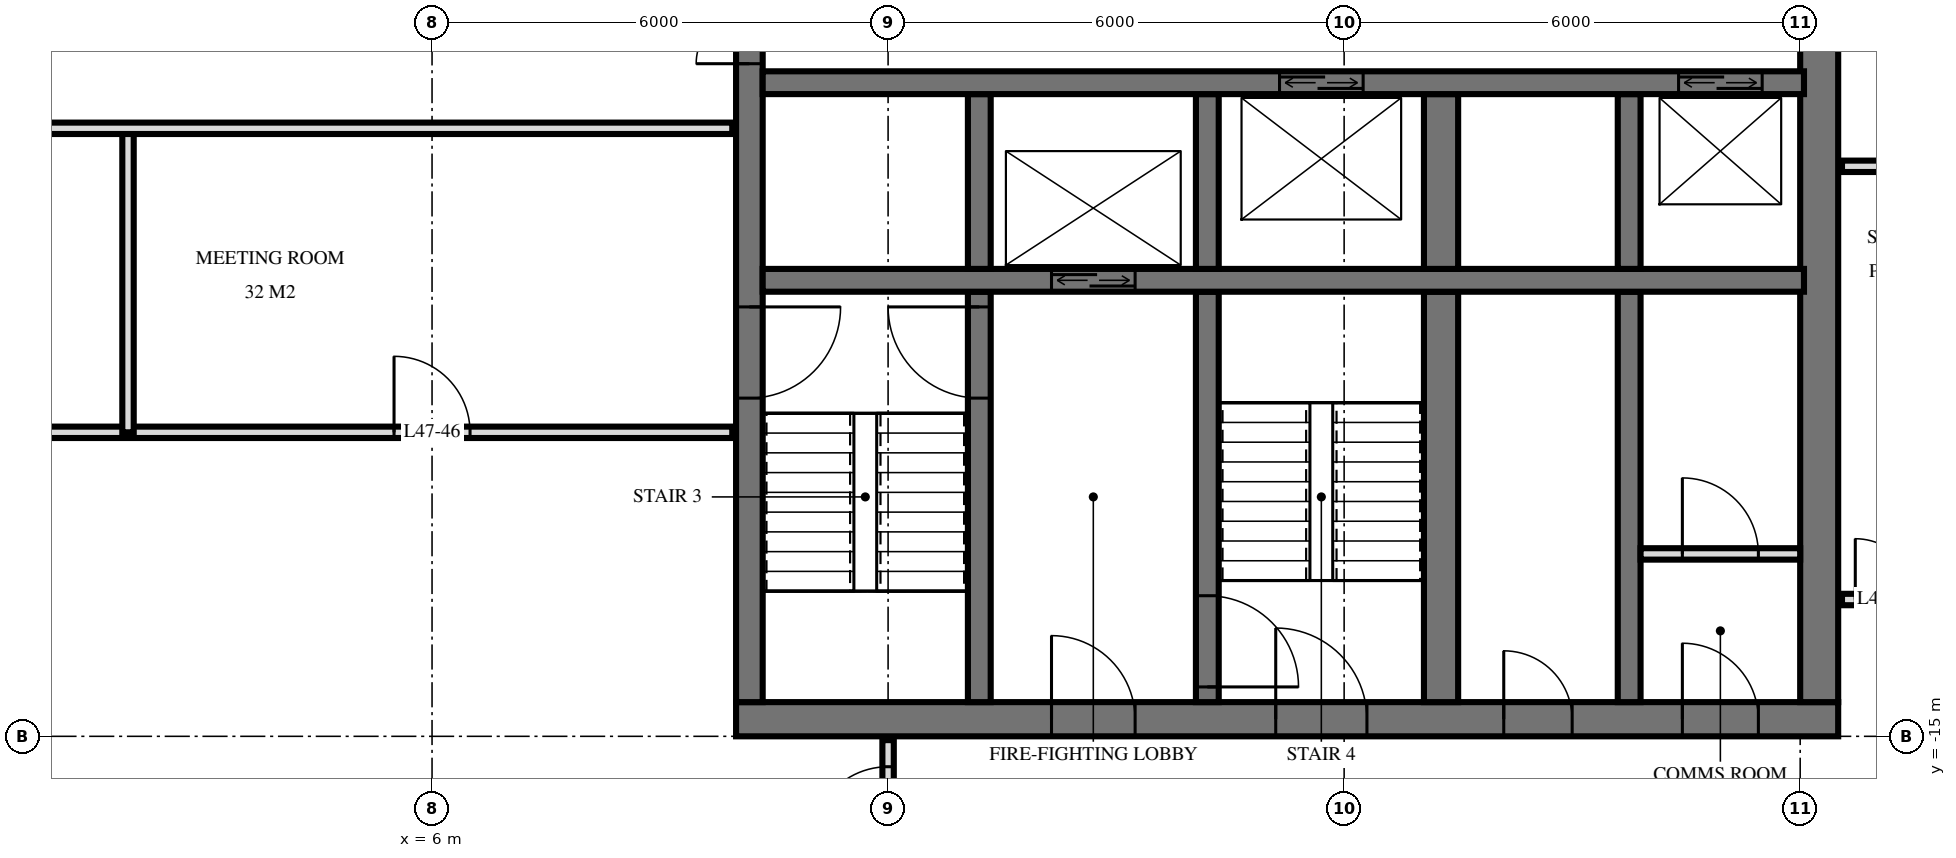
"""IFC4 building model, lengths in metres.
Left out: names, types, materials, properties, quantities, classifications, styles, units other than length and angle.
Written with IfcOpenShell. Run it as: python <this file> out.ifc"""

import sys

from ifc_helpers import new_model, si_unit, direction, frame, frame_2d, origin, place, context, subcontext, project, spatial, rectangle, extrude, element, fill, save


model = new_model("IFC4")
c1 = context("Model", 3, precision=1e-05, world=origin(), true_north=direction((0.0, 1.0)))
c2 = subcontext(c1, "Body", "Model", "MODEL_VIEW")
j1 = project(units=[si_unit("LENGTHUNIT", "METRE"), si_unit("PLANEANGLEUNIT", "RADIAN")], contexts=[c1])
p1 = place(None, origin())
s1 = spatial("IfcSite", under=j1, at=p1, CompositionType="ELEMENT")
p2 = place(p1, origin())
s2 = spatial("IfcBuilding", under=s1, at=p2, CompositionType="ELEMENT")
p3 = place(p2, frame((0.0, 0.0, 183.6)))
s3 = spatial("IfcBuildingStorey", under=s2, at=p3, CompositionType="ELEMENT", Elevation=183.6)
p4 = place(p3, frame((10.0, -14.775, 0.0), z_axis=(0.0, 0.0, 1.0), x_axis=(1.0, 0.0, 0.0)))
e1 = element("IfcWall", 1, at=p4, inside=s3, PredefinedType="SHEAR", context=c2, shape_type="SweptSolid", body=[
    extrude(rectangle(XDim=14.5, YDim=0.45, at=frame_2d((7.25, 0.0))), origin(), (0.0, 0.0, 1.0), 3.5),
])
p5 = place(p4, frame((7.1, 0.0, 0.0)))
e2 = element("IfcOpeningElement", 2, at=p5, cuts=e1, PredefinedType="OPENING", context=c2, shape_type="SweptSolid", body=[
    extrude(rectangle(XDim=1.2, YDim=2.1, at=frame_2d((0.6, 1.05))), frame((0.0, 0.235, 0.0), z_axis=(0.0, -1.0, 0.0), x_axis=(1.0, 0.0, 0.0)), (0.0, 0.0, 1.0), 0.47),
])
p6 = place(p4, frame((4.15, 0.0, 0.0)))
e3 = element("IfcOpeningElement", 3, at=p6, cuts=e1, PredefinedType="OPENING", context=c2, shape_type="SweptSolid", body=[
    extrude(rectangle(XDim=1.1, YDim=2.1, at=frame_2d((0.55, 1.05))), frame((0.0, 0.235, 0.0), z_axis=(0.0, -1.0, 0.0), x_axis=(1.0, 0.0, 0.0)), (0.0, 0.0, 1.0), 0.47),
])
p7 = place(p4, frame((10.1, 0.0, 0.0)))
e4 = element("IfcOpeningElement", 4, at=p7, cuts=e1, PredefinedType="OPENING", context=c2, shape_type="SweptSolid", body=[
    extrude(rectangle(XDim=0.9, YDim=2.1, at=frame_2d((0.45, 1.05))), frame((0.0, 0.235, 0.0), z_axis=(0.0, -1.0, 0.0), x_axis=(1.0, 0.0, 0.0)), (0.0, 0.0, 1.0), 0.47),
])
p8 = place(p4, frame((12.45, 0.0, 0.0)))
e5 = element("IfcOpeningElement", 5, at=p8, cuts=e1, PredefinedType="OPENING", context=c2, shape_type="SweptSolid", body=[
    extrude(rectangle(XDim=1.0, YDim=2.1, at=frame_2d((0.5, 1.05))), frame((0.0, 0.235, 0.0), z_axis=(0.0, -1.0, 0.0), x_axis=(1.0, 0.0, 0.0)), (0.0, 0.0, 1.0), 0.47),
])
p9 = place(p3, frame((10.175, -14.55, 0.0), z_axis=(0.0, 0.0, 1.0), x_axis=(0.0, 1.0, 0.0)))
e6 = element("IfcWall", 6, at=p9, inside=s3, PredefinedType="SHEAR", context=c2, shape_type="SweptSolid", body=[
    extrude(rectangle(XDim=14.1, YDim=0.35, at=frame_2d((7.05, 0.0))), origin(), (0.0, 0.0, 1.0), 3.5),
])
p10 = place(p9, frame((8.4, 0.0, 0.0)))
e7 = element("IfcOpeningElement", 7, at=p10, cuts=e6, PredefinedType="OPENING", context=c2, shape_type="SweptSolid", body=[
    extrude(rectangle(XDim=1.4, YDim=2.4, at=frame_2d((0.7, 1.2))), frame((0.0, 0.185, 0.0), z_axis=(0.0, -1.0, 0.0), x_axis=(1.0, 0.0, 0.0)), (0.0, 0.0, 1.0), 0.37),
])
p11 = place(p9, frame((10.0, 0.0, 0.0)))
e8 = element("IfcOpeningElement", 8, at=p11, cuts=e6, PredefinedType="OPENING", context=c2, shape_type="SweptSolid", body=[
    extrude(rectangle(XDim=1.4, YDim=2.4, at=frame_2d((0.7, 1.2))), frame((0.0, 0.185, 0.0), z_axis=(0.0, -1.0, 0.0), x_axis=(1.0, 0.0, 0.0)), (0.0, 0.0, 1.0), 0.37),
])
p12 = place(p9, frame((4.0, 0.0, 0.0)))
e9 = element("IfcOpeningElement", 9, at=p12, cuts=e6, PredefinedType="OPENING", context=c2, shape_type="SweptSolid", body=[
    extrude(rectangle(XDim=1.2, YDim=2.1, at=frame_2d((0.6, 1.05))), frame((0.0, 0.185, 0.0), z_axis=(0.0, -1.0, 0.0), x_axis=(1.0, 0.0, 0.0)), (0.0, 0.0, 1.0), 0.37),
])
p13 = place(p3, frame((24.25, -14.55, 0.0), z_axis=(0.0, 0.0, 1.0), x_axis=(0.0, 1.0, 0.0)))
e10 = element("IfcWall", 10, at=p13, inside=s3, PredefinedType="SHEAR", context=c2, shape_type="SweptSolid", body=[
    extrude(rectangle(XDim=14.1, YDim=0.5, at=frame_2d((7.05, 0.0))), origin(), (0.0, 0.0, 1.0), 3.5),
])
p14 = place(p3, frame((10.35, -6.4, 0.0), z_axis=(0.0, 0.0, 1.0), x_axis=(1.0, 0.0, 0.0)))
e11 = element("IfcWall", 11, at=p14, inside=s3, PredefinedType="SHEAR", context=c2, shape_type="SweptSolid", body=[
    extrude(rectangle(XDim=13.7, YDim=0.3, at=frame_2d((6.85, 0.0))), origin(), (0.0, 0.0, 1.0), 3.5),
])
p15 = place(p14, frame((12.05, 0.0, 0.0)))
e12 = element("IfcOpeningElement", 12, at=p15, cuts=e11, PredefinedType="OPENING", context=c2, shape_type="SweptSolid", body=[
    extrude(rectangle(XDim=1.1, YDim=2.1, at=frame_2d((0.55, 1.05))), frame((0.0, 0.16, 0.0), z_axis=(0.0, -1.0, 0.0), x_axis=(1.0, 0.0, 0.0)), (0.0, 0.0, 1.0), 0.32),
])
p16 = place(p14, frame((6.8, 0.0, 0.0)))
e13 = element("IfcOpeningElement", 13, at=p16, cuts=e11, PredefinedType="OPENING", context=c2, shape_type="SweptSolid", body=[
    extrude(rectangle(XDim=1.1, YDim=2.1, at=frame_2d((0.55, 1.05))), frame((0.0, 0.16, 0.0), z_axis=(0.0, -1.0, 0.0), x_axis=(1.0, 0.0, 0.0)), (0.0, 0.0, 1.0), 0.32),
])
p17 = place(p3, frame((10.35, -9.0, 0.0), z_axis=(0.0, 0.0, 1.0), x_axis=(1.0, 0.0, 0.0)))
e14 = element("IfcWall", 14, at=p17, inside=s3, PredefinedType="SHEAR", context=c2, shape_type="SweptSolid", body=[
    extrude(rectangle(XDim=13.7, YDim=0.3, at=frame_2d((6.85, 0.0))), origin(), (0.0, 0.0, 1.0), 3.5),
])
p18 = place(p17, frame((3.8, 0.0, 0.0)))
e15 = element("IfcOpeningElement", 15, at=p18, cuts=e14, PredefinedType="OPENING", context=c2, shape_type="SweptSolid", body=[
    extrude(rectangle(XDim=1.1, YDim=2.1, at=frame_2d((0.55, 1.05))), frame((0.0, 0.16, 0.0), z_axis=(0.0, -1.0, 0.0), x_axis=(1.0, 0.0, 0.0)), (0.0, 0.0, 1.0), 0.32),
])
p19 = place(p3, frame((13.2, -8.85, 0.0), z_axis=(0.0, 0.0, 1.0), x_axis=(0.0, 1.0, 0.0)))
e16 = element("IfcWall", 16, at=p19, inside=s3, PredefinedType="SHEAR", context=c2, shape_type="SweptSolid", body=[
    extrude(rectangle(XDim=2.3, YDim=0.3, at=frame_2d((1.15, 0.0))), origin(), (0.0, 0.0, 1.0), 3.5),
])
p20 = place(p3, frame((13.2, -14.55, 0.0), z_axis=(0.0, 0.0, 1.0), x_axis=(0.0, 1.0, 0.0)))
e17 = element("IfcWall", 17, at=p20, inside=s3, PredefinedType="SHEAR", context=c2, shape_type="SweptSolid", body=[
    extrude(rectangle(XDim=5.4, YDim=0.3, at=frame_2d((2.7, 0.0))), origin(), (0.0, 0.0, 1.0), 3.5),
])
p21 = place(p20, frame((4.0, 0.0, 0.0)))
e18 = element("IfcOpeningElement", 18, at=p21, cuts=e17, PredefinedType="OPENING", context=c2, shape_type="SweptSolid", body=[
    extrude(rectangle(XDim=1.2, YDim=2.1, at=frame_2d((0.6, 1.05))), frame((0.0, 0.16, 0.0), z_axis=(0.0, -1.0, 0.0), x_axis=(1.0, 0.0, 0.0)), (0.0, 0.0, 1.0), 0.32),
])
p22 = place(p3, frame((16.2, -8.85, 0.0), z_axis=(0.0, 0.0, 1.0), x_axis=(0.0, 1.0, 0.0)))
e19 = element("IfcWall", 19, at=p22, inside=s3, PredefinedType="SHEAR", context=c2, shape_type="SweptSolid", body=[
    extrude(rectangle(XDim=2.3, YDim=0.3, at=frame_2d((1.15, 0.0))), origin(), (0.0, 0.0, 1.0), 3.5),
])
p23 = place(p3, frame((16.2, -14.55, 0.0), z_axis=(0.0, 0.0, 1.0), x_axis=(0.0, 1.0, 0.0)))
e20 = element("IfcWall", 20, at=p23, inside=s3, PredefinedType="SHEAR", context=c2, shape_type="SweptSolid", body=[
    extrude(rectangle(XDim=5.4, YDim=0.3, at=frame_2d((2.7, 0.0))), origin(), (0.0, 0.0, 1.0), 3.5),
])
p24 = place(p23, frame((0.2, 0.0, 0.0)))
e21 = element("IfcOpeningElement", 21, at=p24, cuts=e20, PredefinedType="OPENING", context=c2, shape_type="SweptSolid", body=[
    extrude(rectangle(XDim=1.2, YDim=2.1, at=frame_2d((0.6, 1.05))), frame((0.0, 0.16, 0.0), z_axis=(0.0, -1.0, 0.0), x_axis=(1.0, 0.0, 0.0)), (0.0, 0.0, 1.0), 0.32),
])
p25 = place(p3, frame((19.275, -8.85, 0.0), z_axis=(0.0, 0.0, 1.0), x_axis=(0.0, 1.0, 0.0)))
e22 = element("IfcWall", 22, at=p25, inside=s3, PredefinedType="SHEAR", context=c2, shape_type="SweptSolid", body=[
    extrude(rectangle(XDim=2.3, YDim=0.45, at=frame_2d((1.15, 0.0))), origin(), (0.0, 0.0, 1.0), 3.5),
])
p26 = place(p3, frame((19.275, -14.55, 0.0), z_axis=(0.0, 0.0, 1.0), x_axis=(0.0, 1.0, 0.0)))
e23 = element("IfcWall", 23, at=p26, inside=s3, PredefinedType="SHEAR", context=c2, shape_type="SweptSolid", body=[
    extrude(rectangle(XDim=5.4, YDim=0.45, at=frame_2d((2.7, 0.0))), origin(), (0.0, 0.0, 1.0), 3.5),
])
p27 = place(p3, frame((21.75, -8.85, 0.0), z_axis=(0.0, 0.0, 1.0), x_axis=(0.0, 1.0, 0.0)))
e24 = element("IfcWall", 24, at=p27, inside=s3, PredefinedType="SHEAR", context=c2, shape_type="SweptSolid", body=[
    extrude(rectangle(XDim=2.3, YDim=0.3, at=frame_2d((1.15, 0.0))), origin(), (0.0, 0.0, 1.0), 3.5),
])
p28 = place(p3, frame((21.75, -14.55, 0.0), z_axis=(0.0, 0.0, 1.0), x_axis=(0.0, 1.0, 0.0)))
e25 = element("IfcWall", 25, at=p28, inside=s3, PredefinedType="SHEAR", context=c2, shape_type="SweptSolid", body=[
    extrude(rectangle(XDim=5.4, YDim=0.3, at=frame_2d((2.7, 0.0))), origin(), (0.0, 0.0, 1.0), 3.5),
])
p29 = place(p3, frame((21.9, -12.6, 0.0), z_axis=(0.0, 0.0, 1.0), x_axis=(1.0, 0.0, 0.0)))
e26 = element("IfcWall", 26, at=p29, inside=s3, PredefinedType="PARTITIONING", context=c2, shape_type="SweptSolid", body=[
    extrude(rectangle(XDim=2.1, YDim=0.15, at=frame_2d((1.05, 0.0))), origin(), (0.0, 0.0, 1.0), 3.2),
])
p30 = place(p29, frame((0.55, 0.0, 0.0)))
e27 = element("IfcOpeningElement", 27, at=p30, cuts=e26, PredefinedType="OPENING", context=c2, shape_type="SweptSolid", body=[
    extrude(rectangle(XDim=1.0, YDim=2.1, at=frame_2d((0.5, 1.05))), frame((0.0, 0.085, 0.0), z_axis=(0.0, -1.0, 0.0), x_axis=(1.0, 0.0, 0.0)), (0.0, 0.0, 1.0), 0.17),
])
p31 = place(p3, frame((12.0, -16.8, 0.0), z_axis=(0.0, 0.0, 1.0), x_axis=(0.0, 1.0, 0.0)))
e28 = element("IfcWall", 28, at=p31, inside=s3, PredefinedType="PARTITIONING", context=c2, shape_type="SweptSolid", body=[
    extrude(rectangle(XDim=1.75, YDim=0.15, at=frame_2d((0.875, 0.0))), origin(), (0.0, 0.0, 1.0), 3.22),
])
p32 = place(p31, frame((0.4, 0.0, 0.0)))
e29 = element("IfcOpeningElement", 29, at=p32, cuts=e28, PredefinedType="OPENING", context=c2, shape_type="SweptSolid", body=[
    extrude(rectangle(XDim=1.0, YDim=2.1, at=frame_2d((0.5, 1.05))), frame((0.0, 0.085, 0.0), z_axis=(0.0, -1.0, 0.0), x_axis=(1.0, 0.0, 0.0)), (0.0, 0.0, 1.0), 0.17),
])
p33 = place(p3, frame((2.0, -11.0, 0.0), z_axis=(0.0, 0.0, 1.0), x_axis=(0.0, 1.0, 0.0)))
e30 = element("IfcWall", 30, at=p33, inside=s3, PredefinedType="PARTITIONING", context=c2, shape_type="SweptSolid", body=[
    extrude(rectangle(XDim=4.0, YDim=0.15, at=frame_2d((2.0, 0.0))), origin(), (0.0, 0.0, 1.0), 3.22),
])
p34 = place(p3, frame((24.55, -13.2, 0.0), z_axis=(0.0, 0.0, 1.0), x_axis=(1.0, 0.0, 0.0)))
e31 = element("IfcWall", 31, at=p34, inside=s3, PredefinedType="PARTITIONING", context=c2, shape_type="SweptSolid", body=[
    extrude(rectangle(XDim=1.15, YDim=0.15, at=frame_2d((0.575, 0.0))), origin(), (0.0, 0.0, 1.0), 3.22),
])
p35 = place(p34, frame((0.175, 0.0, 0.0)))
e32 = element("IfcOpeningElement", 32, at=p35, cuts=e31, PredefinedType="OPENING", context=c2, shape_type="SweptSolid", body=[
    extrude(rectangle(XDim=0.8, YDim=2.1, at=frame_2d((0.4, 1.05))), frame((0.0, 0.085, 0.0), z_axis=(0.0, -1.0, 0.0), x_axis=(1.0, 0.0, 0.0)), (0.0, 0.0, 1.0), 0.17),
])
p36 = place(p3, frame((-9.95, -11.0, 0.0), z_axis=(0.0, 0.0, 1.0), x_axis=(1.0, 0.0, 0.0)))
e33 = element("IfcWall", 33, at=p36, inside=s3, PredefinedType="PARTITIONING", context=c2, shape_type="SweptSolid", body=[
    extrude(rectangle(XDim=19.9, YDim=0.15, at=frame_2d((9.95, 0.0))), origin(), (0.0, 0.0, 1.0), 3.22),
])
p37 = place(p36, frame((9.45, 0.0, 0.0)))
e34 = element("IfcOpeningElement", 34, at=p37, cuts=e33, PredefinedType="OPENING", context=c2, shape_type="SweptSolid", body=[
    extrude(rectangle(XDim=1.0, YDim=2.1, at=frame_2d((0.5, 1.05))), frame((0.0, 0.085, 0.0), z_axis=(0.0, -1.0, 0.0), x_axis=(1.0, 0.0, 0.0)), (0.0, 0.0, 1.0), 0.17),
])
p38 = place(p36, frame((15.45, 0.0, 0.0)))
e35 = element("IfcOpeningElement", 35, at=p38, cuts=e33, PredefinedType="OPENING", context=c2, shape_type="SweptSolid", body=[
    extrude(rectangle(XDim=1.0, YDim=2.1, at=frame_2d((0.5, 1.05))), frame((0.0, 0.085, 0.0), z_axis=(0.0, -1.0, 0.0), x_axis=(1.0, 0.0, 0.0)), (0.0, 0.0, 1.0), 0.17),
])
p39 = place(p3, frame((24.55, -7.5, 0.0), z_axis=(0.0, 0.0, 1.0), x_axis=(1.0, 0.0, 0.0)))
e36 = element("IfcWall", 36, at=p39, inside=s3, PredefinedType="PARTITIONING", context=c2, shape_type="SweptSolid", body=[
    extrude(rectangle(XDim=2.27, YDim=0.15, at=frame_2d((1.135, 0.0))), origin(), (0.0, 0.0, 1.0), 3.22),
])
p40 = place(p39, frame((0.75, 0.0, 0.0)))
e37 = element("IfcOpeningElement", 37, at=p40, cuts=e36, PredefinedType="OPENING", context=c2, shape_type="SweptSolid", body=[
    extrude(rectangle(XDim=0.9, YDim=2.1, at=frame_2d((0.45, 1.05))), frame((0.0, 0.085, 0.0), z_axis=(0.0, -1.0, 0.0), x_axis=(1.0, 0.0, 0.0)), (0.0, 0.0, 1.0), 0.17),
])
p41 = place(p3, frame((-9.95, -7.0, 0.0), z_axis=(0.0, 0.0, 1.0), x_axis=(1.0, 0.0, 0.0)))
e38 = element("IfcWall", 38, at=p41, inside=s3, PredefinedType="PARTITIONING", context=c2, shape_type="SweptSolid", body=[
    extrude(rectangle(XDim=19.9, YDim=0.15, at=frame_2d((9.95, 0.0))), origin(), (0.0, 0.0, 1.0), 3.22),
])
p42 = place(p41, frame((9.45, 0.0, 0.0)))
e39 = element("IfcOpeningElement", 39, at=p42, cuts=e38, PredefinedType="OPENING", context=c2, shape_type="SweptSolid", body=[
    extrude(rectangle(XDim=1.0, YDim=2.1, at=frame_2d((0.5, 1.05))), frame((0.0, 0.085, 0.0), z_axis=(0.0, -1.0, 0.0), x_axis=(1.0, 0.0, 0.0)), (0.0, 0.0, 1.0), 0.17),
])
p43 = place(p41, frame((3.45, 0.0, 0.0)))
e40 = element("IfcOpeningElement", 40, at=p43, cuts=e38, PredefinedType="OPENING", context=c2, shape_type="SweptSolid", body=[
    extrude(rectangle(XDim=1.0, YDim=2.1, at=frame_2d((0.5, 1.05))), frame((0.0, 0.085, 0.0), z_axis=(0.0, -1.0, 0.0), x_axis=(1.0, 0.0, 0.0)), (0.0, 0.0, 1.0), 0.17),
])
p44 = place(p15, origin())
e41 = element("IfcDoor", 41, at=p44, inside=s3, OperationType="DOUBLE_DOOR_SLIDING", PredefinedType="USERDEFINED", context=c2, shape_type="SweptSolid", body=[
    extrude(rectangle(XDim=1.1, YDim=2.1, at=frame_2d((0.55, 1.05))), frame((0.0, 0.025, 0.0), z_axis=(0.0, -1.0, 0.0), x_axis=(1.0, 0.0, 0.0)), (0.0, 0.0, 1.0), 0.05),
])
fill(e12, e41)
p45 = place(p18, origin())
e42 = element("IfcDoor", 42, at=p45, inside=s3, OperationType="DOUBLE_DOOR_SLIDING", PredefinedType="USERDEFINED", context=c2, shape_type="SweptSolid", body=[
    extrude(rectangle(XDim=1.1, YDim=2.1, at=frame_2d((0.55, 1.05))), frame((0.0, 0.025, 0.0), z_axis=(0.0, -1.0, 0.0), x_axis=(1.0, 0.0, 0.0)), (0.0, 0.0, 1.0), 0.05),
])
fill(e15, e42)
p46 = place(p16, origin())
e43 = element("IfcDoor", 43, at=p46, inside=s3, OperationType="DOUBLE_DOOR_SLIDING", PredefinedType="USERDEFINED", context=c2, shape_type="SweptSolid", body=[
    extrude(rectangle(XDim=1.1, YDim=2.1, at=frame_2d((0.55, 1.05))), frame((0.0, 0.025, 0.0), z_axis=(0.0, -1.0, 0.0), x_axis=(1.0, 0.0, 0.0)), (0.0, 0.0, 1.0), 0.05),
])
fill(e13, e43)
p47 = place(p10, origin())
e44 = element("IfcDoor", 44, at=p47, inside=s3, OperationType="DOUBLE_DOOR_SINGLE_SWING", PredefinedType="DOOR", context=c2, shape_type="SweptSolid", body=[
    extrude(rectangle(XDim=1.4, YDim=2.4, at=frame_2d((0.7, 1.2))), frame((0.0, 0.025, 0.0), z_axis=(0.0, -1.0, 0.0), x_axis=(1.0, 0.0, 0.0)), (0.0, 0.0, 1.0), 0.05),
])
fill(e7, e44)
p48 = place(p12, frame((0.6, 0.0, 0.0), z_axis=(0.0, 0.0, 1.0), x_axis=(-1.0, 0.0, 0.0)))
e45 = element("IfcDoor", 45, at=p48, inside=s3, OperationType="SINGLE_SWING_RIGHT", PredefinedType="DOOR", context=c2, shape_type="SweptSolid", body=[
    extrude(rectangle(XDim=1.2, YDim=2.1, at=frame_2d((0.0, 1.05))), frame((0.0, -0.025, 0.0), z_axis=(0.0, 1.0, 0.0), x_axis=(-1.0, 0.0, 0.0)), (0.0, 0.0, 1.0), 0.05),
])
fill(e9, e45)
p49 = place(p5, origin())
e46 = element("IfcDoor", 46, at=p49, inside=s3, OperationType="SINGLE_SWING_RIGHT", PredefinedType="DOOR", context=c2, shape_type="SweptSolid", body=[
    extrude(rectangle(XDim=1.2, YDim=2.1, at=frame_2d((0.6, 1.05))), frame((0.0, 0.025, 0.0), z_axis=(0.0, -1.0, 0.0), x_axis=(1.0, 0.0, 0.0)), (0.0, 0.0, 1.0), 0.05),
])
fill(e2, e46)
p50 = place(p6, origin())
e47 = element("IfcDoor", 47, at=p50, inside=s3, OperationType="SINGLE_SWING_RIGHT", PredefinedType="DOOR", context=c2, shape_type="SweptSolid", body=[
    extrude(rectangle(XDim=1.1, YDim=2.1, at=frame_2d((0.55, 1.05))), frame((0.0, 0.025, 0.0), z_axis=(0.0, -1.0, 0.0), x_axis=(1.0, 0.0, 0.0)), (0.0, 0.0, 1.0), 0.05),
])
fill(e3, e47)
p51 = place(p7, origin())
e48 = element("IfcDoor", 48, at=p51, inside=s3, OperationType="SINGLE_SWING_RIGHT", PredefinedType="DOOR", context=c2, shape_type="SweptSolid", body=[
    extrude(rectangle(XDim=0.9, YDim=2.1, at=frame_2d((0.45, 1.05))), frame((0.0, 0.025, 0.0), z_axis=(0.0, -1.0, 0.0), x_axis=(1.0, 0.0, 0.0)), (0.0, 0.0, 1.0), 0.05),
])
fill(e4, e48)
p52 = place(p8, origin())
e49 = element("IfcDoor", 49, at=p52, inside=s3, OperationType="SINGLE_SWING_RIGHT", PredefinedType="DOOR", context=c2, shape_type="SweptSolid", body=[
    extrude(rectangle(XDim=1.0, YDim=2.1, at=frame_2d((0.5, 1.05))), frame((0.0, 0.025, 0.0), z_axis=(0.0, -1.0, 0.0), x_axis=(1.0, 0.0, 0.0)), (0.0, 0.0, 1.0), 0.05),
])
fill(e5, e49)
p53 = place(p21, origin())
e50 = element("IfcDoor", 50, at=p53, inside=s3, OperationType="SINGLE_SWING_LEFT", PredefinedType="DOOR", context=c2, shape_type="SweptSolid", body=[
    extrude(rectangle(XDim=1.2, YDim=2.1, at=frame_2d((0.6, 1.05))), frame((0.0, 0.025, 0.0), z_axis=(0.0, -1.0, 0.0), x_axis=(1.0, 0.0, 0.0)), (0.0, 0.0, 1.0), 0.05),
])
fill(e18, e50)
p54 = place(p24, frame((0.6, 0.0, 0.0), z_axis=(0.0, 0.0, 1.0), x_axis=(-1.0, 0.0, 0.0)))
e51 = element("IfcDoor", 51, at=p54, inside=s3, OperationType="SINGLE_SWING_LEFT", PredefinedType="DOOR", context=c2, shape_type="SweptSolid", body=[
    extrude(rectangle(XDim=1.2, YDim=2.1, at=frame_2d((0.0, 1.05))), frame((0.0, -0.025, 0.0), z_axis=(0.0, 1.0, 0.0), x_axis=(-1.0, 0.0, 0.0)), (0.0, 0.0, 1.0), 0.05),
])
fill(e21, e51)
p55 = place(p30, origin())
e52 = element("IfcDoor", 52, at=p55, inside=s3, OperationType="SINGLE_SWING_RIGHT", PredefinedType="DOOR", context=c2, shape_type="SweptSolid", body=[
    extrude(rectangle(XDim=1.0, YDim=2.1, at=frame_2d((0.5, 1.05))), frame((0.0, 0.025, 0.0), z_axis=(0.0, -1.0, 0.0), x_axis=(1.0, 0.0, 0.0)), (0.0, 0.0, 1.0), 0.05),
])
fill(e27, e52)
p56 = place(p32, origin())
e53 = element("IfcDoor", 53, at=p56, inside=s3, OperationType="SINGLE_SWING_RIGHT", PredefinedType="DOOR", context=c2, shape_type="SweptSolid", body=[
    extrude(rectangle(XDim=1.0, YDim=2.1, at=frame_2d((0.5, 1.05))), frame((0.0, 0.025, 0.0), z_axis=(0.0, -1.0, 0.0), x_axis=(1.0, 0.0, 0.0)), (0.0, 0.0, 1.0), 0.05),
])
fill(e29, e53)
p57 = place(p35, origin())
e54 = element("IfcDoor", 54, at=p57, inside=s3, OperationType="SINGLE_SWING_RIGHT", PredefinedType="DOOR", context=c2, shape_type="SweptSolid", body=[
    extrude(rectangle(XDim=0.8, YDim=2.1, at=frame_2d((0.4, 1.05))), frame((0.0, 0.025, 0.0), z_axis=(0.0, -1.0, 0.0), x_axis=(1.0, 0.0, 0.0)), (0.0, 0.0, 1.0), 0.05),
])
fill(e32, e54)
p58 = place(p38, origin())
e55 = element("IfcDoor", 55, at=p58, inside=s3, OperationType="SINGLE_SWING_RIGHT", PredefinedType="DOOR", context=c2, shape_type="SweptSolid", body=[
    extrude(rectangle(XDim=1.0, YDim=2.1, at=frame_2d((0.5, 1.05))), frame((0.0, 0.025, 0.0), z_axis=(0.0, -1.0, 0.0), x_axis=(1.0, 0.0, 0.0)), (0.0, 0.0, 1.0), 0.05),
])
fill(e35, e55)
save(model, sys.argv[1])
